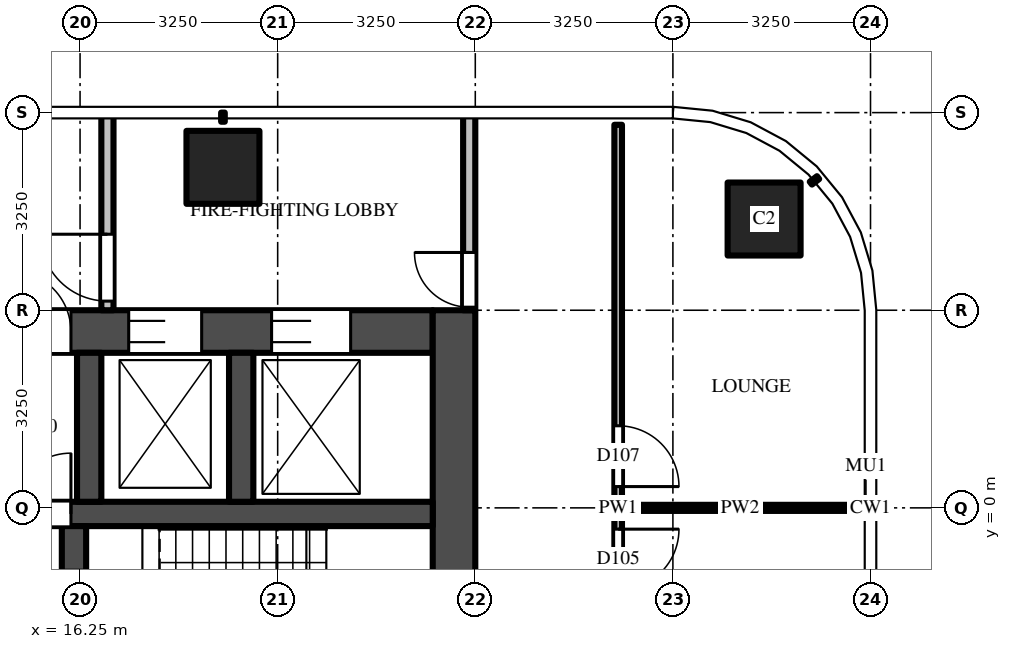
"""IFC4 building model, lengths in metres.
Left out: names, types, materials, properties, quantities, classifications, styles, units other than length and angle.
Written with IfcOpenShell. Run it as: python <this file> out.ifc"""

import sys

from ifc_helpers import new_model, si_unit, direction, frame, frame_2d, origin, origin_2d, place, context, subcontext, project, spatial, rectangle, extrude, source, transform, mapped, element, fill, save


model = new_model("IFC4")
c1 = context("Model", 3, precision=1e-05, world=origin(), true_north=direction((0.0, 1.0)))
c2 = subcontext(c1, "Body", "Model", "MODEL_VIEW")
j1 = project(units=[si_unit("LENGTHUNIT", "METRE"), si_unit("PLANEANGLEUNIT", "RADIAN")], contexts=[c1])
p1 = place(None, origin())
s1 = spatial("IfcSite", under=j1, at=p1, CompositionType="ELEMENT")
p2 = place(p1, origin())
s2 = spatial("IfcBuilding", under=s1, at=p2, CompositionType="ELEMENT")
p3 = place(p2, frame((0.0, 0.0, 193.2)))
s3 = spatial("IfcBuildingStorey", under=s2, at=p3, CompositionType="ELEMENT", Elevation=193.2)
m1 = source(origin(), c2, "Body", "SweptSolid", [
    extrude(rectangle(XDim=1.2, YDim=1.2, at=origin_2d()), origin(), (0.0, 0.0, 1.0), 3.9),
])
for number, where, z_axis, x_axis in (
    (1, (18.6, 5.6, 0.0), (0.0, 0.0, 1.0), (1.0, 0.0, 0.0)),
    (2, (27.5, 4.75, 0.0), (0.0, 0.0, 1.0), (1.0, 0.0, 0.0)),
):
    element("IfcColumn", number, at=place(p3, frame(where, z_axis=z_axis, x_axis=x_axis)), inside=s3, PredefinedType="COLUMN", context=c2, shape_type="MappedRepresentation", body=[
        mapped(m1, transform((0.0, 0.0, 0.0))),
    ])
m2 = source(origin(), c2, "Body", "SweptSolid", [
    extrude(rectangle(XDim=14.85, YDim=0.7, at=frame_2d((7.425, 0.0))), origin(), (0.0, 0.0, 1.0), 3.7),
])
p4 = place(p3, frame((7.2, 2.9, 0.0), z_axis=(0.0, 0.0, 1.0), x_axis=(1.0, 0.0, 0.0)))
e3 = element("IfcWall", 3, at=p4, inside=s3, PredefinedType="SHEAR", context=c2, shape_type="MappedRepresentation", body=[
    mapped(m2, transform((0.0, 0.0, 0.0))),
])
m3 = source(origin(), c2, "Body", "SweptSolid", [
    extrude(rectangle(XDim=1.1, YDim=2.1, at=frame_2d((0.55, 1.05))), frame((0.0, 0.36, 0.0), z_axis=(0.0, -1.0, 0.0), x_axis=(1.0, 0.0, 0.0)), (0.0, 0.0, 1.0), 0.72),
])
p5 = place(p4, frame((0.55, 0.0, 0.0)))
e4 = element("IfcOpeningElement", 4, at=p5, cuts=e3, PredefinedType="OPENING", context=c2, shape_type="MappedRepresentation", body=[
    mapped(m3, transform((0.0, 0.0, 0.0))),
])
p6 = place(p4, frame((3.15, 0.0, 0.0)))
e5 = element("IfcOpeningElement", 5, at=p6, cuts=e3, PredefinedType="OPENING", context=c2, shape_type="MappedRepresentation", body=[
    mapped(m3, transform((0.0, 0.0, 0.0))),
])
m4 = source(origin(), c2, "Body", "SweptSolid", [
    extrude(rectangle(XDim=1.2, YDim=2.1, at=frame_2d((0.6, 1.05))), frame((0.0, 0.36, 0.0), z_axis=(0.0, -1.0, 0.0), x_axis=(1.0, 0.0, 0.0)), (0.0, 0.0, 1.0), 0.72),
])
p7 = place(p4, frame((5.7, 0.0, 0.0)))
e6 = element("IfcOpeningElement", 6, at=p7, cuts=e3, PredefinedType="OPENING", context=c2, shape_type="MappedRepresentation", body=[
    mapped(m4, transform((0.0, 0.0, 0.0))),
])
m5 = source(origin(), c2, "Body", "SweptSolid", [
    extrude(rectangle(XDim=1.3, YDim=2.1, at=frame_2d((0.65, 1.05))), frame((0.0, 0.36, 0.0), z_axis=(0.0, -1.0, 0.0), x_axis=(1.0, 0.0, 0.0)), (0.0, 0.0, 1.0), 0.72),
])
p8 = place(p4, frame((12.2, 0.0, 0.0)))
e7 = element("IfcOpeningElement", 7, at=p8, cuts=e3, PredefinedType="OPENING", context=c2, shape_type="MappedRepresentation", body=[
    mapped(m5, transform((0.0, 0.0, 0.0))),
])
p9 = place(p4, frame((9.85, 0.0, 0.0)))
e8 = element("IfcOpeningElement", 8, at=p9, cuts=e3, PredefinedType="OPENING", context=c2, shape_type="MappedRepresentation", body=[
    mapped(m4, transform((0.0, 0.0, 0.0))),
])
m6 = source(origin(), c2, "Body", "SweptSolid", [
    extrude(rectangle(XDim=1.0, YDim=2.1, at=frame_2d((0.5, 1.05))), frame((0.0, 0.36, 0.0), z_axis=(0.0, -1.0, 0.0), x_axis=(1.0, 0.0, 0.0)), (0.0, 0.0, 1.0), 0.72),
])
p10 = place(p4, frame((7.9, 0.0, 0.0)))
e9 = element("IfcOpeningElement", 9, at=p10, cuts=e3, PredefinedType="OPENING", context=c2, shape_type="MappedRepresentation", body=[
    mapped(m6, transform((0.0, 0.0, 0.0))),
])
m7 = source(origin(), c2, "Body", "SweptSolid", [
    extrude(rectangle(XDim=9.05, YDim=0.7, at=frame_2d((4.525, 0.0))), origin(), (0.0, 0.0, 1.0), 3.7),
])
p11 = place(p3, frame((22.4, -5.8, 0.0), z_axis=(0.0, 0.0, 1.0), x_axis=(0.0, 1.0, 0.0)))
e10 = element("IfcWall", 10, at=p11, inside=s3, PredefinedType="SHEAR", context=c2, shape_type="MappedRepresentation", body=[
    mapped(m7, transform((0.0, 0.0, 0.0))),
])
m8 = source(origin(), c2, "Body", "SweptSolid", [
    extrude(rectangle(XDim=14.85, YDim=0.4, at=frame_2d((7.425, 0.0))), origin(), (0.0, 0.0, 1.0), 3.7),
])
p12 = place(p3, frame((7.2, -0.1, 0.0), z_axis=(0.0, 0.0, 1.0), x_axis=(1.0, 0.0, 0.0)))
e11 = element("IfcWall", 11, at=p12, inside=s3, PredefinedType="SHEAR", context=c2, shape_type="MappedRepresentation", body=[
    mapped(m8, transform((0.0, 0.0, 0.0))),
])
m9 = source(origin(), c2, "Body", "SweptSolid", [
    extrude(rectangle(XDim=1.0, YDim=2.1, at=frame_2d((0.5, 1.05))), frame((0.0, 0.21, 0.0), z_axis=(0.0, -1.0, 0.0), x_axis=(1.0, 0.0, 0.0)), (0.0, 0.0, 1.0), 0.42),
])
p13 = place(p12, frame((7.9, 0.0, 0.0)))
e12 = element("IfcOpeningElement", 12, at=p13, cuts=e11, PredefinedType="OPENING", context=c2, shape_type="MappedRepresentation", body=[
    mapped(m9, transform((0.0, 0.0, 0.0))),
])
m10 = source(origin(), c2, "Body", "SweptSolid", [
    extrude(rectangle(XDim=5.5, YDim=0.4, at=frame_2d((2.75, 0.0))), origin(), (0.0, 0.0, 1.0), 3.7),
])
p14 = place(p3, frame((16.15, -5.8, 0.0), z_axis=(0.0, 0.0, 1.0), x_axis=(0.0, 1.0, 0.0)))
e13 = element("IfcWall", 13, at=p14, inside=s3, PredefinedType="SHEAR", context=c2, shape_type="MappedRepresentation", body=[
    mapped(m10, transform((0.0, 0.0, 0.0))),
])
m11 = source(origin(), c2, "Body", "SweptSolid", [
    extrude(rectangle(XDim=1.1, YDim=2.1, at=frame_2d((0.55, 1.05))), frame((0.0, 0.21, 0.0), z_axis=(0.0, -1.0, 0.0), x_axis=(1.0, 0.0, 0.0)), (0.0, 0.0, 1.0), 0.42),
])
p15 = place(p14, frame((0.725, 0.0, 0.0)))
e14 = element("IfcOpeningElement", 14, at=p15, cuts=e13, PredefinedType="OPENING", context=c2, shape_type="MappedRepresentation", body=[
    mapped(m11, transform((0.0, 0.0, 0.0))),
])
p16 = place(p14, frame((3.675, 0.0, 0.0)))
e15 = element("IfcOpeningElement", 15, at=p16, cuts=e13, PredefinedType="OPENING", context=c2, shape_type="MappedRepresentation", body=[
    mapped(m11, transform((0.0, 0.0, 0.0))),
])
m12 = source(origin(), c2, "Body", "SweptSolid", [
    extrude(rectangle(XDim=2.45, YDim=0.4, at=frame_2d((1.225, 0.0))), origin(), (0.0, 0.0, 1.0), 3.7),
])
for number, where, z_axis, x_axis in (
    (16, (16.4, 0.1, 0.0), (0.0, 0.0, 1.0), (0.0, 1.0, 0.0)),
    (17, (18.9, 0.1, 0.0), (0.0, 0.0, 1.0), (0.0, 1.0, 0.0)),
):
    element("IfcWall", number, at=place(p3, frame(where, z_axis=z_axis, x_axis=x_axis)), inside=s3, PredefinedType="SHEAR", context=c2, shape_type="MappedRepresentation", body=[
        mapped(m12, transform((0.0, 0.0, 0.0))),
    ])
m13 = source(origin(), c2, "Body", "SweptSolid", [
    extrude(rectangle(XDim=3.25, YDim=0.2, at=frame_2d((1.625, 0.0))), origin(), (0.0, 0.0, 1.0), 3.7),
])
p17 = place(p3, frame((16.7, 3.25, 0.0), z_axis=(0.0, 0.0, 1.0), x_axis=(0.0, 1.0, 0.0)))
e18 = element("IfcWall", 18, at=p17, inside=s3, PredefinedType="PARTITIONING", context=c2, shape_type="MappedRepresentation", body=[
    mapped(m13, transform((0.0, 0.0, 0.0))),
])
m14 = source(origin(), c2, "Body", "SweptSolid", [
    extrude(rectangle(XDim=1.1, YDim=2.1, at=frame_2d((0.55, 1.05))), frame((0.0, 0.11, 0.0), z_axis=(0.0, -1.0, 0.0), x_axis=(1.0, 0.0, 0.0)), (0.0, 0.0, 1.0), 0.22),
])
p18 = place(p17, frame((0.15, 0.0, 0.0)))
e19 = element("IfcOpeningElement", 19, at=p18, cuts=e18, PredefinedType="OPENING", context=c2, shape_type="MappedRepresentation", body=[
    mapped(m14, transform((0.0, 0.0, 0.0))),
])
p19 = place(p3, frame((22.65, 3.25, 0.0), z_axis=(0.0, 0.0, 1.0), x_axis=(0.0, 1.0, 0.0)))
e20 = element("IfcWall", 20, at=p19, inside=s3, PredefinedType="PARTITIONING", context=c2, shape_type="MappedRepresentation", body=[
    mapped(m13, transform((0.0, 0.0, 0.0))),
])
m15 = source(origin(), c2, "Body", "SweptSolid", [
    extrude(rectangle(XDim=0.9, YDim=2.1, at=frame_2d((0.45, 1.05))), frame((0.0, 0.11, 0.0), z_axis=(0.0, -1.0, 0.0), x_axis=(1.0, 0.0, 0.0)), (0.0, 0.0, 1.0), 0.22),
])
p20 = place(p19, frame((0.05, 0.0, 0.0)))
e21 = element("IfcOpeningElement", 21, at=p20, cuts=e20, PredefinedType="OPENING", context=c2, shape_type="MappedRepresentation", body=[
    mapped(m15, transform((0.0, 0.0, 0.0))),
])
m16 = source(origin(), c2, "Body", "SweptSolid", [
    extrude(rectangle(XDim=12.6, YDim=0.125, at=frame_2d((6.3, 0.0))), origin(), (0.0, 0.0, 1.0), 2.78),
])
p21 = place(p3, frame((25.1, 6.3, 0.0), z_axis=(0.0, 0.0, 1.0), x_axis=(0.0, -1.0, 0.0)))
e22 = element("IfcWall", 22, at=p21, inside=s3, PredefinedType="PARTITIONING", context=c2, shape_type="MappedRepresentation", body=[
    mapped(m16, transform((0.0, 0.0, 0.0))),
])
m17 = source(origin(), c2, "Body", "SweptSolid", [
    extrude(rectangle(XDim=1.0, YDim=2.1, at=frame_2d((0.5, 1.05))), frame((0.0, 0.073, 0.0), z_axis=(0.0, -1.0, 0.0), x_axis=(1.0, 0.0, 0.0)), (0.0, 0.0, 1.0), 0.145),
])
p22 = place(p21, frame((6.65, 0.0, 0.0)))
e23 = element("IfcOpeningElement", 23, at=p22, cuts=e22, PredefinedType="OPENING", context=c2, shape_type="MappedRepresentation", body=[
    mapped(m17, transform((0.0, 0.0, 0.0))),
])
p23 = place(p21, frame((4.95, 0.0, 0.0)))
e24 = element("IfcOpeningElement", 24, at=p23, cuts=e22, PredefinedType="OPENING", context=c2, shape_type="MappedRepresentation", body=[
    mapped(m17, transform((0.0, 0.0, 0.0))),
])
m18 = source(origin(), c2, "Body", "SweptSolid", [
    extrude(rectangle(XDim=3.887, YDim=0.1, at=frame_2d((1.944, 0.0))), origin(), (0.0, 0.0, 1.0), 2.78),
])
p24 = place(p3, frame((25.163, 0.0, 0.0), z_axis=(0.0, 0.0, 1.0), x_axis=(1.0, 0.0, 0.0)))
e25 = element("IfcWall", 25, at=p24, inside=s3, PredefinedType="PARTITIONING", context=c2, shape_type="MappedRepresentation", body=[
    mapped(m18, transform((0.0, 0.0, 0.0))),
])
m19 = source(origin(), c2, "Body", "SweptSolid", [
    extrude(rectangle(XDim=1.3, YDim=2.1, at=frame_2d((0.65, 1.05))), frame((0.0, -0.275, 0.0), z_axis=(0.0, -1.0, 0.0), x_axis=(1.0, 0.0, 0.0)), (0.0, 0.0, 1.0), 0.05),
])
p25 = place(p8, origin())
e26 = element("IfcDoor", 26, at=p25, inside=s3, OperationType="DOUBLE_DOOR_SLIDING", PredefinedType="DOOR", context=c2, shape_type="MappedRepresentation", body=[
    mapped(m19, transform((0.0, 0.0, 0.0))),
])
fill(e7, e26)
m20 = source(origin(), c2, "Body", "SweptSolid", [
    extrude(rectangle(XDim=1.2, YDim=2.1, at=frame_2d((0.6, 1.05))), frame((0.0, -0.275, 0.0), z_axis=(0.0, -1.0, 0.0), x_axis=(1.0, 0.0, 0.0)), (0.0, 0.0, 1.0), 0.05),
])
p26 = place(p9, origin())
e27 = element("IfcDoor", 27, at=p26, inside=s3, OperationType="DOUBLE_DOOR_SLIDING", PredefinedType="DOOR", context=c2, shape_type="MappedRepresentation", body=[
    mapped(m20, transform((0.0, 0.0, 0.0))),
])
fill(e8, e27)
m21 = source(origin(), c2, "Body", "SweptSolid", [
    extrude(rectangle(XDim=1.0, YDim=2.1, at=frame_2d((0.5, 1.05))), frame((0.0, 0.025, 0.0), z_axis=(0.0, -1.0, 0.0), x_axis=(1.0, 0.0, 0.0)), (0.0, 0.0, 1.0), 0.05),
])
p27 = place(p13, origin())
e28 = element("IfcDoor", 28, at=p27, inside=s3, OperationType="SINGLE_SWING_RIGHT", PredefinedType="DOOR", context=c2, shape_type="MappedRepresentation", body=[
    mapped(m21, transform((0.0, 0.0, 0.0))),
])
fill(e12, e28)
m22 = source(origin(), c2, "Body", "SweptSolid", [
    extrude(rectangle(XDim=1.0, YDim=2.1, at=frame_2d((0.5, 1.05))), frame((0.0, -0.275, 0.0), z_axis=(0.0, -1.0, 0.0), x_axis=(1.0, 0.0, 0.0)), (0.0, 0.0, 1.0), 0.05),
])
p28 = place(p10, origin())
e29 = element("IfcDoor", 29, at=p28, inside=s3, OperationType="SINGLE_SWING_LEFT", PredefinedType="DOOR", context=c2, shape_type="MappedRepresentation", body=[
    mapped(m22, transform((0.0, 0.0, 0.0))),
])
fill(e9, e29)
m23 = source(origin(), c2, "Body", "SweptSolid", [
    extrude(rectangle(XDim=1.1, YDim=2.1, at=frame_2d((0.55, 1.05))), frame((0.0, 0.025, 0.0), z_axis=(0.0, -1.0, 0.0), x_axis=(1.0, 0.0, 0.0)), (0.0, 0.0, 1.0), 0.05),
])
p29 = place(p18, origin())
e30 = element("IfcDoor", 30, at=p29, inside=s3, OperationType="SINGLE_SWING_RIGHT", PredefinedType="DOOR", context=c2, shape_type="MappedRepresentation", body=[
    mapped(m23, transform((0.0, 0.0, 0.0))),
])
fill(e19, e30)
m24 = source(origin(), c2, "Body", "SweptSolid", [
    extrude(rectangle(XDim=0.9, YDim=2.1, at=frame_2d((0.45, 1.05))), frame((0.0, 0.025, 0.0), z_axis=(0.0, -1.0, 0.0), x_axis=(1.0, 0.0, 0.0)), (0.0, 0.0, 1.0), 0.05),
])
p30 = place(p20, origin())
e31 = element("IfcDoor", 31, at=p30, inside=s3, OperationType="SINGLE_SWING_RIGHT", PredefinedType="DOOR", context=c2, shape_type="MappedRepresentation", body=[
    mapped(m24, transform((0.0, 0.0, 0.0))),
])
fill(e21, e31)
p31 = place(p22, origin())
e32 = element("IfcDoor", 32, at=p31, inside=s3, OperationType="SINGLE_SWING_LEFT", PredefinedType="DOOR", context=c2, shape_type="MappedRepresentation", body=[
    mapped(m21, transform((0.0, 0.0, 0.0))),
])
fill(e23, e32)
p32 = place(p23, origin())
e33 = element("IfcDoor", 33, at=p32, inside=s3, OperationType="SINGLE_SWING_RIGHT", PredefinedType="DOOR", context=c2, shape_type="MappedRepresentation", body=[
    mapped(m21, transform((0.0, 0.0, 0.0))),
])
fill(e24, e33)
save(model, sys.argv[1])
